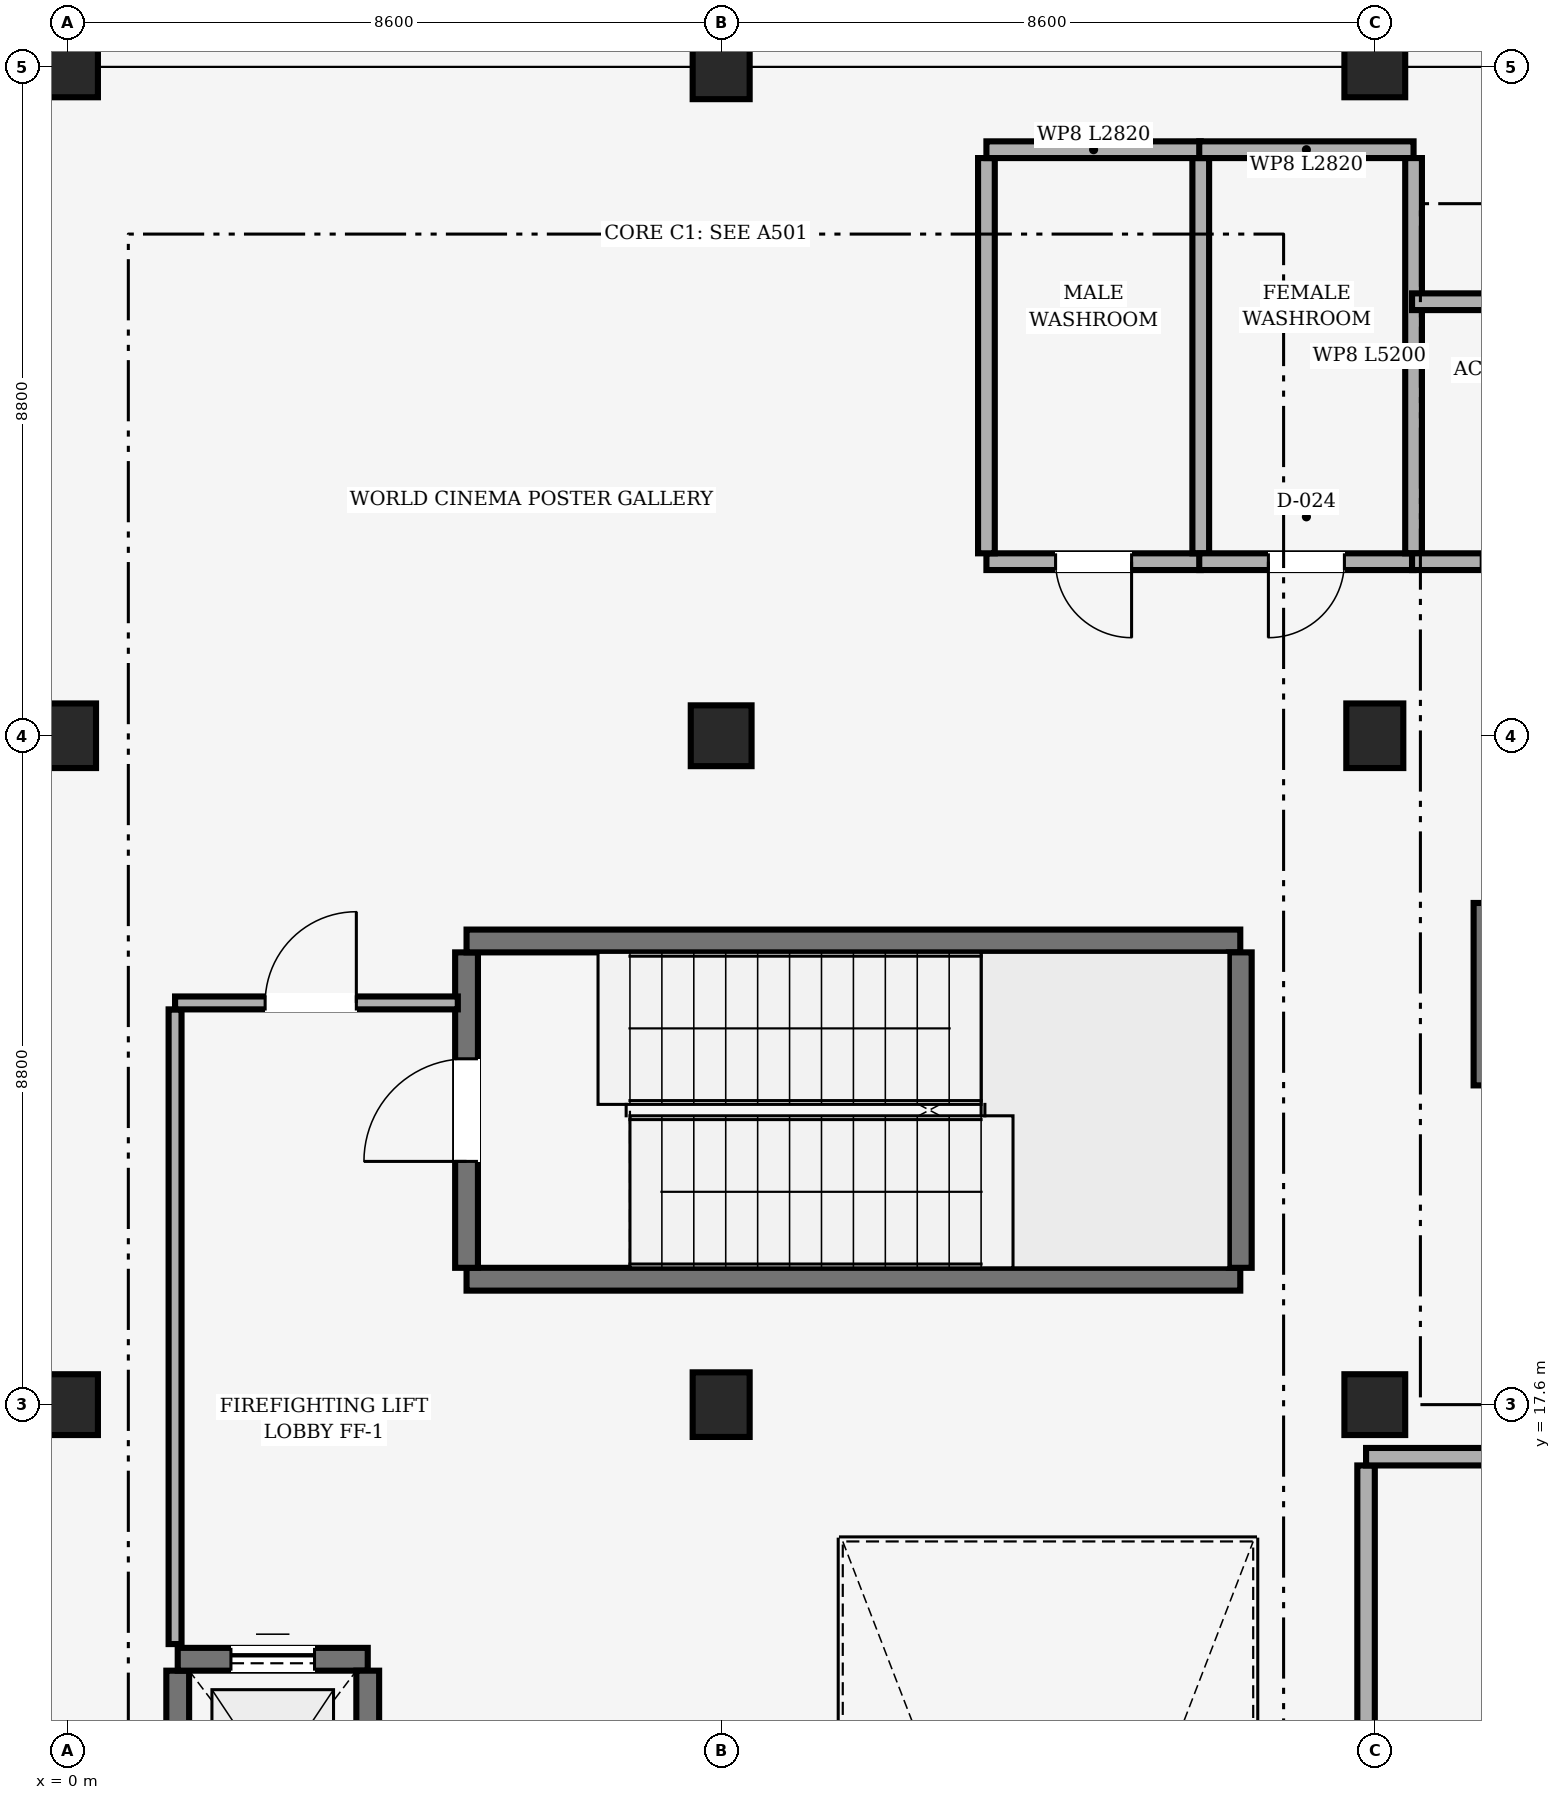
"""IFC4 building model, lengths in metres.
Left out: names, types, materials, properties, quantities, classifications, styles, units other than length and angle.
Written with IfcOpenShell. Run it as: python <this file> out.ifc"""

import sys

from ifc_helpers import new_model, si_unit, direction, frame, frame_2d, origin, origin_2d, place, context, subcontext, project, spatial, rectangle, extrude, element, fill, save


model = new_model("IFC4")
c1 = context("Model", 3, precision=1e-05, world=origin(), true_north=direction((0.0, 1.0)))
c2 = subcontext(c1, "Body", "Model", "MODEL_VIEW")
j1 = project(units=[si_unit("LENGTHUNIT", "METRE"), si_unit("PLANEANGLEUNIT", "RADIAN")], contexts=[c1])
p1 = place(None, origin())
s1 = spatial("IfcSite", under=j1, at=p1, CompositionType="ELEMENT")
p2 = place(p1, origin())
s2 = spatial("IfcBuilding", under=s1, at=p2, CompositionType="ELEMENT")
p3 = place(p2, frame((0.0, 0.0, 8.4)))
s3 = spatial("IfcBuildingStorey", under=s2, at=p3, CompositionType="ELEMENT", Elevation=8.4)
p4 = place(p3, frame((0.0, 17.6, 0.0), z_axis=(0.0, 0.0, 1.0), x_axis=(1.0, 0.0, 0.0)))
e1 = element("IfcColumn", 1, at=p4, inside=s3, PredefinedType="COLUMN", context=c2, shape_type="SweptSolid", body=[
    extrude(rectangle(XDim=0.8, YDim=0.8, at=origin_2d()), origin(), (0.0, 0.0, 1.0), 3.34),
])
p5 = place(p3, frame((0.0, 26.4, 0.0), z_axis=(0.0, 0.0, 1.0), x_axis=(1.0, 0.0, 0.0)))
e2 = element("IfcColumn", 2, at=p5, inside=s3, PredefinedType="COLUMN", context=c2, shape_type="SweptSolid", body=[
    extrude(rectangle(XDim=0.75, YDim=0.85, at=origin_2d()), origin(), (0.0, 0.0, 1.0), 3.34),
])
p6 = place(p3, frame((0.0, 35.2, 0.0), z_axis=(0.0, 0.0, 1.0), x_axis=(1.0, 0.0, 0.0)))
e3 = element("IfcColumn", 3, at=p6, inside=s3, PredefinedType="COLUMN", context=c2, shape_type="SweptSolid", body=[
    extrude(rectangle(XDim=0.8, YDim=0.8, at=origin_2d()), origin(), (0.0, 0.0, 1.0), 3.34),
])
p7 = place(p3, frame((8.6, 17.6, 0.0), z_axis=(0.0, 0.0, 1.0), x_axis=(1.0, 0.0, 0.0)))
e4 = element("IfcColumn", 4, at=p7, inside=s3, PredefinedType="COLUMN", context=c2, shape_type="SweptSolid", body=[
    extrude(rectangle(XDim=0.75, YDim=0.85, at=origin_2d()), origin(), (0.0, 0.0, 1.0), 3.34),
])
p8 = place(p3, frame((8.6, 26.4, 0.0), z_axis=(0.0, 0.0, 1.0), x_axis=(1.0, 0.0, 0.0)))
e5 = element("IfcColumn", 5, at=p8, inside=s3, PredefinedType="COLUMN", context=c2, shape_type="SweptSolid", body=[
    extrude(rectangle(XDim=0.8, YDim=0.8, at=origin_2d()), origin(), (0.0, 0.0, 1.0), 3.34),
])
p9 = place(p3, frame((8.6, 35.2, 0.0), z_axis=(0.0, 0.0, 1.0), x_axis=(1.0, 0.0, 0.0)))
e6 = element("IfcColumn", 6, at=p9, inside=s3, PredefinedType="COLUMN", context=c2, shape_type="SweptSolid", body=[
    extrude(rectangle(XDim=0.75, YDim=0.85, at=origin_2d()), origin(), (0.0, 0.0, 1.0), 3.34),
])
p10 = place(p3, frame((17.2, 17.6, 0.0), z_axis=(0.0, 0.0, 1.0), x_axis=(1.0, 0.0, 0.0)))
e7 = element("IfcColumn", 7, at=p10, inside=s3, PredefinedType="COLUMN", context=c2, shape_type="SweptSolid", body=[
    extrude(rectangle(XDim=0.8, YDim=0.8, at=origin_2d()), origin(), (0.0, 0.0, 1.0), 3.34),
])
p11 = place(p3, frame((17.2, 26.4, 0.0), z_axis=(0.0, 0.0, 1.0), x_axis=(1.0, 0.0, 0.0)))
e8 = element("IfcColumn", 8, at=p11, inside=s3, PredefinedType="COLUMN", context=c2, shape_type="SweptSolid", body=[
    extrude(rectangle(XDim=0.75, YDim=0.85, at=origin_2d()), origin(), (0.0, 0.0, 1.0), 3.34),
])
p12 = place(p3, frame((17.2, 35.2, 0.0), z_axis=(0.0, 0.0, 1.0), x_axis=(1.0, 0.0, 0.0)))
e9 = element("IfcColumn", 9, at=p12, inside=s3, PredefinedType="COLUMN", context=c2, shape_type="SweptSolid", body=[
    extrude(rectangle(XDim=0.8, YDim=0.8, at=origin_2d()), origin(), (0.0, 0.0, 1.0), 3.34),
])
p13 = place(p3, frame((15.43, 19.25, 0.0), z_axis=(0.0, 0.0, 1.0), x_axis=(-1.0, 0.0, 0.0)))
e10 = element("IfcWall", 10, at=p13, inside=s3, PredefinedType="SHEAR", context=c2, shape_type="SweptSolid", body=[
    extrude(rectangle(XDim=10.18, YDim=0.3, at=frame_2d((5.09, 0.0))), origin(), (0.0, 0.0, 1.0), 3.34),
])
p14 = place(p3, frame((5.25, 19.4, 0.0), z_axis=(0.0, 0.0, 1.0), x_axis=(0.0, 1.0, 0.0)))
e11 = element("IfcWall", 11, at=p14, inside=s3, PredefinedType="SHEAR", context=c2, shape_type="SweptSolid", body=[
    extrude(rectangle(XDim=4.15, YDim=0.3, at=frame_2d((2.075, 0.0))), origin(), (0.0, 0.0, 1.0), 3.34),
])
p15 = place(p14, frame((1.4, 0.0, 0.0)))
e12 = element("IfcOpeningElement", 12, at=p15, cuts=e11, PredefinedType="OPENING", context=c2, shape_type="SweptSolid", body=[
    extrude(rectangle(XDim=1.35, YDim=2.2, at=frame_2d((0.675, 1.1))), frame((0.0, 0.15, 0.0), z_axis=(0.0, -1.0, 0.0), x_axis=(1.0, 0.0, 0.0)), (0.0, 0.0, 1.0), 0.3),
])
p16 = place(p3, frame((5.25, 23.7, 0.0), z_axis=(0.0, 0.0, 1.0), x_axis=(1.0, 0.0, 0.0)))
e13 = element("IfcWall", 13, at=p16, inside=s3, PredefinedType="SHEAR", context=c2, shape_type="SweptSolid", body=[
    extrude(rectangle(XDim=10.18, YDim=0.3, at=frame_2d((5.09, 0.0))), origin(), (0.0, 0.0, 1.0), 3.34),
])
p17 = place(p3, frame((15.43, 23.55, 0.0), z_axis=(0.0, 0.0, 1.0), x_axis=(0.0, -1.0, 0.0)))
e14 = element("IfcWall", 14, at=p17, inside=s3, PredefinedType="SHEAR", context=c2, shape_type="SweptSolid", body=[
    extrude(rectangle(XDim=4.15, YDim=0.3, at=frame_2d((2.075, 0.0))), origin(), (0.0, 0.0, 1.0), 3.34),
])
p18 = place(p3, frame((1.45, 11.2, 0.0), z_axis=(0.0, 0.0, 1.0), x_axis=(0.0, 1.0, 0.0)))
e15 = element("IfcWall", 15, at=p18, inside=s3, PredefinedType="SHEAR", context=c2, shape_type="SweptSolid", body=[
    extrude(rectangle(XDim=2.9, YDim=0.3, at=frame_2d((1.45, 0.0))), origin(), (0.0, 0.0, 1.0), 3.34),
])
p19 = place(p3, frame((1.45, 14.25, 0.0), z_axis=(0.0, 0.0, 1.0), x_axis=(1.0, 0.0, 0.0)))
e16 = element("IfcWall", 16, at=p19, inside=s3, PredefinedType="SHEAR", context=c2, shape_type="SweptSolid", body=[
    extrude(rectangle(XDim=2.5, YDim=0.3, at=frame_2d((1.25, 0.0))), origin(), (0.0, 0.0, 1.0), 3.34),
])
p20 = place(p19, frame((0.7, 0.0, 0.0)))
e17 = element("IfcOpeningElement", 17, at=p20, cuts=e16, PredefinedType="OPENING", context=c2, shape_type="SweptSolid", body=[
    extrude(rectangle(XDim=1.1, YDim=2.1, at=frame_2d((0.55, 1.05))), frame((0.0, 0.15, 0.0), z_axis=(0.0, -1.0, 0.0), x_axis=(1.0, 0.0, 0.0)), (0.0, 0.0, 1.0), 0.3),
])
p21 = place(p3, frame((3.95, 14.1, 0.0), z_axis=(0.0, 0.0, 1.0), x_axis=(0.0, -1.0, 0.0)))
e18 = element("IfcWall", 18, at=p21, inside=s3, PredefinedType="SHEAR", context=c2, shape_type="SweptSolid", body=[
    extrude(rectangle(XDim=2.9, YDim=0.3, at=frame_2d((1.45, 0.0))), origin(), (0.0, 0.0, 1.0), 3.34),
])
p22 = place(p3, frame((18.65, 21.8, 0.0), z_axis=(0.0, 0.0, 1.0), x_axis=(0.0, 1.0, 0.0)))
e19 = element("IfcWall", 19, at=p22, inside=s3, PredefinedType="SHEAR", context=c2, shape_type="SweptSolid", body=[
    extrude(rectangle(XDim=2.4, YDim=0.3, at=frame_2d((1.2, 0.0))), origin(), (0.0, 0.0, 1.0), 3.34),
])
p23 = place(p3, frame((1.415, 14.45, 0.0), z_axis=(0.0, 0.0, 1.0), x_axis=(0.0, 1.0, 0.0)))
e20 = element("IfcWall", 20, at=p23, inside=s3, PredefinedType="PARTITIONING", context=c2, shape_type="SweptSolid", body=[
    extrude(rectangle(XDim=8.35, YDim=0.17, at=frame_2d((4.175, 0.0))), origin(), (0.0, 0.0, 1.0), 3.32),
])
p24 = place(p3, frame((1.415, 22.885, 0.0), z_axis=(0.0, 0.0, 1.0), x_axis=(1.0, 0.0, 0.0)))
e21 = element("IfcWall", 21, at=p24, inside=s3, PredefinedType="PARTITIONING", context=c2, shape_type="SweptSolid", body=[
    extrude(rectangle(XDim=3.72, YDim=0.17, at=frame_2d((1.86, 0.0))), origin(), (0.0, 0.0, 1.0), 3.32),
])
p25 = place(p24, frame((1.185, 0.0, 0.0)))
e22 = element("IfcOpeningElement", 22, at=p25, cuts=e21, PredefinedType="OPENING", context=c2, shape_type="SweptSolid", body=[
    extrude(rectangle(XDim=1.2, YDim=2.15, at=frame_2d((0.6, 1.075))), frame((0.0, 0.085, 0.0), z_axis=(0.0, -1.0, 0.0), x_axis=(1.0, 0.0, 0.0)), (0.0, 0.0, 1.0), 0.17),
])
p26 = place(p3, frame((14.91, 28.69, 0.0), z_axis=(0.0, 0.0, 1.0), x_axis=(-1.0, 0.0, 0.0)))
e23 = element("IfcWall", 23, at=p26, inside=s3, PredefinedType="PLUMBINGWALL", context=c2, shape_type="SweptSolid", body=[
    extrude(rectangle(XDim=2.82, YDim=0.22, at=frame_2d((1.41, 0.0))), origin(), (0.0, 0.0, 1.0), 3.32),
])
p27 = place(p26, frame((0.91, 0.0, 0.0)))
e24 = element("IfcOpeningElement", 24, at=p27, cuts=e23, PredefinedType="OPENING", context=c2, shape_type="SweptSolid", body=[
    extrude(rectangle(XDim=1.0, YDim=2.1, at=frame_2d((0.5, 1.05))), frame((0.0, 0.11, 0.0), z_axis=(0.0, -1.0, 0.0), x_axis=(1.0, 0.0, 0.0)), (0.0, 0.0, 1.0), 0.22),
])
p28 = place(p3, frame((12.09, 28.8, 0.0), z_axis=(0.0, 0.0, 1.0), x_axis=(0.0, 1.0, 0.0)))
e25 = element("IfcWall", 25, at=p28, inside=s3, PredefinedType="PLUMBINGWALL", context=c2, shape_type="SweptSolid", body=[
    extrude(rectangle(XDim=5.2, YDim=0.22, at=frame_2d((2.6, 0.0))), origin(), (0.0, 0.0, 1.0), 3.32),
])
p29 = place(p3, frame((12.09, 34.11, 0.0), z_axis=(0.0, 0.0, 1.0), x_axis=(1.0, 0.0, 0.0)))
e26 = element("IfcWall", 26, at=p29, inside=s3, PredefinedType="PLUMBINGWALL", context=c2, shape_type="SweptSolid", body=[
    extrude(rectangle(XDim=2.82, YDim=0.22, at=frame_2d((1.41, 0.0))), origin(), (0.0, 0.0, 1.0), 3.32),
])
p30 = place(p3, frame((14.91, 34.0, 0.0), z_axis=(0.0, 0.0, 1.0), x_axis=(0.0, -1.0, 0.0)))
e27 = element("IfcWall", 27, at=p30, inside=s3, PredefinedType="PLUMBINGWALL", context=c2, shape_type="SweptSolid", body=[
    extrude(rectangle(XDim=5.2, YDim=0.22, at=frame_2d((2.6, 0.0))), origin(), (0.0, 0.0, 1.0), 3.32),
])
p31 = place(p3, frame((17.71, 28.69, 0.0), z_axis=(0.0, 0.0, 1.0), x_axis=(-1.0, 0.0, 0.0)))
e28 = element("IfcWall", 28, at=p31, inside=s3, PredefinedType="PLUMBINGWALL", context=c2, shape_type="SweptSolid", body=[
    extrude(rectangle(XDim=2.82, YDim=0.22, at=frame_2d((1.41, 0.0))), origin(), (0.0, 0.0, 1.0), 3.32),
])
p32 = place(p31, frame((0.91, 0.0, 0.0)))
e29 = element("IfcOpeningElement", 29, at=p32, cuts=e28, PredefinedType="OPENING", context=c2, shape_type="SweptSolid", body=[
    extrude(rectangle(XDim=1.0, YDim=2.1, at=frame_2d((0.5, 1.05))), frame((0.0, 0.11, 0.0), z_axis=(0.0, -1.0, 0.0), x_axis=(1.0, 0.0, 0.0)), (0.0, 0.0, 1.0), 0.22),
])
p33 = place(p3, frame((14.89, 34.11, 0.0), z_axis=(0.0, 0.0, 1.0), x_axis=(1.0, 0.0, 0.0)))
e30 = element("IfcWall", 30, at=p33, inside=s3, PredefinedType="PLUMBINGWALL", context=c2, shape_type="SweptSolid", body=[
    extrude(rectangle(XDim=2.82, YDim=0.22, at=frame_2d((1.41, 0.0))), origin(), (0.0, 0.0, 1.0), 3.32),
])
p34 = place(p3, frame((17.71, 34.0, 0.0), z_axis=(0.0, 0.0, 1.0), x_axis=(0.0, -1.0, 0.0)))
e31 = element("IfcWall", 31, at=p34, inside=s3, PredefinedType="PLUMBINGWALL", context=c2, shape_type="SweptSolid", body=[
    extrude(rectangle(XDim=5.2, YDim=0.22, at=frame_2d((2.6, 0.0))), origin(), (0.0, 0.0, 1.0), 3.32),
])
p35 = place(p3, frame((20.51, 28.69, 0.0), z_axis=(0.0, 0.0, 1.0), x_axis=(-1.0, 0.0, 0.0)))
e32 = element("IfcWall", 32, at=p35, inside=s3, PredefinedType="PLUMBINGWALL", context=c2, shape_type="SweptSolid", body=[
    extrude(rectangle(XDim=2.82, YDim=0.22, at=frame_2d((1.41, 0.0))), origin(), (0.0, 0.0, 1.0), 3.32),
])
p36 = place(p35, frame((0.91, 0.0, 0.0)))
e33 = element("IfcOpeningElement", 33, at=p36, cuts=e32, PredefinedType="OPENING", context=c2, shape_type="SweptSolid", body=[
    extrude(rectangle(XDim=1.0, YDim=2.1, at=frame_2d((0.5, 1.05))), frame((0.0, 0.11, 0.0), z_axis=(0.0, -1.0, 0.0), x_axis=(1.0, 0.0, 0.0)), (0.0, 0.0, 1.0), 0.22),
])
p37 = place(p3, frame((17.69, 32.11, 0.0), z_axis=(0.0, 0.0, 1.0), x_axis=(1.0, 0.0, 0.0)))
e34 = element("IfcWall", 34, at=p37, inside=s3, PredefinedType="PLUMBINGWALL", context=c2, shape_type="SweptSolid", body=[
    extrude(rectangle(XDim=2.82, YDim=0.22, at=frame_2d((1.41, 0.0))), origin(), (0.0, 0.0, 1.0), 3.32),
])
p38 = place(p3, frame((17.085, 0.8, 0.0), z_axis=(0.0, 0.0, 1.0), x_axis=(0.0, 1.0, 0.0)))
e35 = element("IfcWall", 35, at=p38, inside=s3, PredefinedType="PARTITIONING", context=c2, shape_type="SweptSolid", body=[
    extrude(rectangle(XDim=16.0, YDim=0.23, at=frame_2d((8.0, 0.0))), origin(), (0.0, 0.0, 1.0), 2.57),
])
p39 = place(p3, frame((17.085, 16.915, 0.0), z_axis=(0.0, 0.0, 1.0), x_axis=(1.0, 0.0, 0.0)))
e36 = element("IfcWall", 36, at=p39, inside=s3, PredefinedType="PARTITIONING", context=c2, shape_type="SweptSolid", body=[
    extrude(rectangle(XDim=17.43, YDim=0.23, at=frame_2d((8.715, 0.0))), origin(), (0.0, 0.0, 1.0), 3.32),
])
p40 = place(p39, frame((3.815, 0.0, 0.0)))
e37 = element("IfcOpeningElement", 37, at=p40, cuts=e36, PredefinedType="OPENING", context=c2, shape_type="SweptSolid", body=[
    extrude(rectangle(XDim=1.2, YDim=2.15, at=frame_2d((0.6, 1.075))), frame((0.0, 0.115, 0.0), z_axis=(0.0, -1.0, 0.0), x_axis=(1.0, 0.0, 0.0)), (0.0, 0.0, 1.0), 0.23),
])
p41 = place(p15, origin())
e38 = element("IfcDoor", 38, at=p41, inside=s3, OperationType="SINGLE_SWING_LEFT", PredefinedType="DOOR", context=c2, shape_type="SweptSolid", body=[
    extrude(rectangle(XDim=1.35, YDim=2.2, at=frame_2d((0.675, 1.1))), frame((0.0, 0.025, 0.0), z_axis=(0.0, -1.0, 0.0), x_axis=(1.0, 0.0, 0.0)), (0.0, 0.0, 1.0), 0.05),
])
fill(e12, e38)
p42 = place(p20, origin())
e39 = element("IfcDoor", 39, at=p42, inside=s3, OperationType="SLIDING_TO_LEFT", PredefinedType="DOOR", context=c2, shape_type="SweptSolid", body=[
    extrude(rectangle(XDim=1.1, YDim=2.1, at=frame_2d((0.55, 1.05))), frame((0.0, 0.025, 0.0), z_axis=(0.0, -1.0, 0.0), x_axis=(1.0, 0.0, 0.0)), (0.0, 0.0, 1.0), 0.05),
])
fill(e17, e39)
p43 = place(p25, origin())
e40 = element("IfcDoor", 40, at=p43, inside=s3, OperationType="SINGLE_SWING_RIGHT", PredefinedType="DOOR", context=c2, shape_type="SweptSolid", body=[
    extrude(rectangle(XDim=1.2, YDim=2.15, at=frame_2d((0.6, 1.075))), frame((0.0, 0.025, 0.0), z_axis=(0.0, -1.0, 0.0), x_axis=(1.0, 0.0, 0.0)), (0.0, 0.0, 1.0), 0.05),
])
fill(e22, e40)
p44 = place(p27, origin())
e41 = element("IfcDoor", 41, at=p44, inside=s3, OperationType="SINGLE_SWING_LEFT", PredefinedType="DOOR", context=c2, shape_type="SweptSolid", body=[
    extrude(rectangle(XDim=1.0, YDim=2.1, at=frame_2d((0.5, 1.05))), frame((0.0, 0.025, 0.0), z_axis=(0.0, -1.0, 0.0), x_axis=(1.0, 0.0, 0.0)), (0.0, 0.0, 1.0), 0.05),
])
fill(e24, e41)
p45 = place(p32, origin())
e42 = element("IfcDoor", 42, at=p45, inside=s3, OperationType="SINGLE_SWING_RIGHT", PredefinedType="DOOR", context=c2, shape_type="SweptSolid", body=[
    extrude(rectangle(XDim=1.0, YDim=2.1, at=frame_2d((0.5, 1.05))), frame((0.0, 0.025, 0.0), z_axis=(0.0, -1.0, 0.0), x_axis=(1.0, 0.0, 0.0)), (0.0, 0.0, 1.0), 0.05),
])
fill(e29, e42)
save(model, sys.argv[1])
